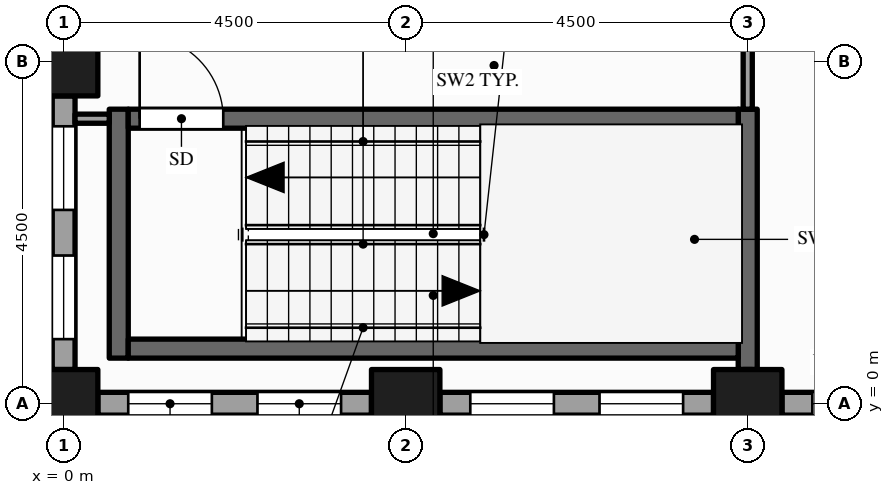
"""IFC4 building model, lengths in metres.
Left out: names, types, materials, properties, quantities, classifications, styles, units other than length and angle.
Written with IfcOpenShell. Run it as: python <this file> out.ifc"""

import sys

from ifc_helpers import new_model, si_unit, direction, frame, frame_2d, origin, origin_2d, place, context, subcontext, project, spatial, rectangle, hollow_rectangle, extrude, element, fill, save


model = new_model("IFC4")
c1 = context("Model", 3, precision=1e-05, world=origin(), true_north=direction((0.0, 1.0)))
c2 = subcontext(c1, "Body", "Model", "MODEL_VIEW")
j1 = project(units=[si_unit("LENGTHUNIT", "METRE"), si_unit("PLANEANGLEUNIT", "RADIAN")], contexts=[c1])
p1 = place(None, origin())
s1 = spatial("IfcSite", under=j1, at=p1, CompositionType="ELEMENT")
p2 = place(p1, origin())
s2 = spatial("IfcBuilding", under=s1, at=p2, CompositionType="ELEMENT")
p3 = place(p2, frame((0.0, 0.0, 155.0)))
s3 = spatial("IfcBuildingStorey", under=s2, at=p3, CompositionType="ELEMENT", Elevation=155.0)
for number, where, z_axis, x_axis in (
    (1, (0.0, 0.0, -0.15), (0.0, 0.0, 1.0), (1.0, 0.0, 0.0)),
    (2, (0.0, 4.5, -0.15), (0.0, 0.0, 1.0), (1.0, 0.0, 0.0)),
    (3, (4.5, 0.0, -0.15), (0.0, 0.0, 1.0), (1.0, 0.0, 0.0)),
    (4, (9.0, 0.0, -0.15), (0.0, 0.0, 1.0), (1.0, 0.0, 0.0)),
):
    element("IfcColumn", number, at=place(p3, frame(where, z_axis=z_axis, x_axis=x_axis)), inside=s3, PredefinedType="COLUMN", context=c2, shape_type="SweptSolid", body=[
        extrude(hollow_rectangle(XDim=0.9, YDim=0.9, WallThickness=0.045, at=origin_2d()), origin(), (0.0, 0.0, 1.0), 4.0),
    ])
p4 = place(p3, frame((0.45, 0.0, 0.0), z_axis=(0.0, 0.0, 1.0), x_axis=(1.0, 0.0, 0.0)))
e5 = element("IfcWall", 5, at=p4, inside=s3, PredefinedType="STANDARD", context=c2, shape_type="SweptSolid", body=[
    extrude(rectangle(XDim=3.6, YDim=0.3, at=frame_2d((1.8, 0.0))), origin(), (0.0, 0.0, 1.0), 3.149),
])
p5 = place(p4, frame((0.4, 0.0, 0.9)))
e6 = element("IfcOpeningElement", 6, at=p5, cuts=e5, PredefinedType="OPENING", context=c2, shape_type="SweptSolid", body=[
    extrude(rectangle(XDim=1.1, YDim=2.0, at=frame_2d((0.55, 1.0))), frame((0.0, 0.16, 0.0), z_axis=(0.0, -1.0, 0.0), x_axis=(1.0, 0.0, 0.0)), (0.0, 0.0, 1.0), 0.32),
])
p6 = place(p4, frame((2.1, 0.0, 0.9)))
e7 = element("IfcOpeningElement", 7, at=p6, cuts=e5, PredefinedType="OPENING", context=c2, shape_type="SweptSolid", body=[
    extrude(rectangle(XDim=1.1, YDim=2.0, at=frame_2d((0.55, 1.0))), frame((0.0, 0.16, 0.0), z_axis=(0.0, -1.0, 0.0), x_axis=(1.0, 0.0, 0.0)), (0.0, 0.0, 1.0), 0.32),
])
p7 = place(p3, frame((4.95, 0.0, 0.0), z_axis=(0.0, 0.0, 1.0), x_axis=(1.0, 0.0, 0.0)))
e8 = element("IfcWall", 8, at=p7, inside=s3, PredefinedType="STANDARD", context=c2, shape_type="SweptSolid", body=[
    extrude(rectangle(XDim=3.6, YDim=0.3, at=frame_2d((1.8, 0.0))), origin(), (0.0, 0.0, 1.0), 3.149),
])
p8 = place(p7, frame((0.4, 0.0, 0.9)))
e9 = element("IfcOpeningElement", 9, at=p8, cuts=e8, PredefinedType="OPENING", context=c2, shape_type="SweptSolid", body=[
    extrude(rectangle(XDim=1.1, YDim=2.0, at=frame_2d((0.55, 1.0))), frame((0.0, 0.16, 0.0), z_axis=(0.0, -1.0, 0.0), x_axis=(1.0, 0.0, 0.0)), (0.0, 0.0, 1.0), 0.32),
])
p9 = place(p7, frame((2.1, 0.0, 0.9)))
e10 = element("IfcOpeningElement", 10, at=p9, cuts=e8, PredefinedType="OPENING", context=c2, shape_type="SweptSolid", body=[
    extrude(rectangle(XDim=1.1, YDim=2.0, at=frame_2d((0.55, 1.0))), frame((0.0, 0.16, 0.0), z_axis=(0.0, -1.0, 0.0), x_axis=(1.0, 0.0, 0.0)), (0.0, 0.0, 1.0), 0.32),
])
p10 = place(p3, frame((9.45, 0.0, 0.0), z_axis=(0.0, 0.0, 1.0), x_axis=(1.0, 0.0, 0.0)))
e11 = element("IfcWall", 11, at=p10, inside=s3, PredefinedType="STANDARD", context=c2, shape_type="SweptSolid", body=[
    extrude(rectangle(XDim=3.6, YDim=0.3, at=frame_2d((1.8, 0.0))), origin(), (0.0, 0.0, 1.0), 2.87),
])
p11 = place(p10, frame((0.4, 0.0, 0.9)))
e12 = element("IfcOpeningElement", 12, at=p11, cuts=e11, PredefinedType="OPENING", context=c2, shape_type="SweptSolid", body=[
    extrude(rectangle(XDim=1.1, YDim=1.75, at=frame_2d((0.55, 0.875))), frame((0.0, 0.16, 0.0), z_axis=(0.0, -1.0, 0.0), x_axis=(1.0, 0.0, 0.0)), (0.0, 0.0, 1.0), 0.32),
])
p12 = place(p10, frame((2.1, 0.0, 0.9)))
e13 = element("IfcOpeningElement", 13, at=p12, cuts=e11, PredefinedType="OPENING", context=c2, shape_type="SweptSolid", body=[
    extrude(rectangle(XDim=1.1, YDim=1.75, at=frame_2d((0.55, 0.875))), frame((0.0, 0.16, 0.0), z_axis=(0.0, -1.0, 0.0), x_axis=(1.0, 0.0, 0.0)), (0.0, 0.0, 1.0), 0.32),
])
p13 = place(p3, frame((0.0, 4.05, 0.0), z_axis=(0.0, 0.0, 1.0), x_axis=(0.0, -1.0, 0.0)))
e14 = element("IfcWall", 14, at=p13, inside=s3, PredefinedType="STANDARD", context=c2, shape_type="SweptSolid", body=[
    extrude(rectangle(XDim=3.6, YDim=0.3, at=frame_2d((1.8, 0.0))), origin(), (0.0, 0.0, 1.0), 3.149),
])
p14 = place(p13, frame((0.4, 0.0, 0.9)))
e15 = element("IfcOpeningElement", 15, at=p14, cuts=e14, PredefinedType="OPENING", context=c2, shape_type="SweptSolid", body=[
    extrude(rectangle(XDim=1.1, YDim=2.0, at=frame_2d((0.55, 1.0))), frame((0.0, 0.16, 0.0), z_axis=(0.0, -1.0, 0.0), x_axis=(1.0, 0.0, 0.0)), (0.0, 0.0, 1.0), 0.32),
])
p15 = place(p13, frame((2.1, 0.0, 0.9)))
e16 = element("IfcOpeningElement", 16, at=p15, cuts=e14, PredefinedType="OPENING", context=c2, shape_type="SweptSolid", body=[
    extrude(rectangle(XDim=1.1, YDim=2.0, at=frame_2d((0.55, 1.0))), frame((0.0, 0.16, 0.0), z_axis=(0.0, -1.0, 0.0), x_axis=(1.0, 0.0, 0.0)), (0.0, 0.0, 1.0), 0.32),
])
p16 = place(p3, frame((0.725, 0.6, 0.0), z_axis=(0.0, 0.0, 1.0), x_axis=(0.0, 1.0, 0.0)))
e17 = element("IfcWall", 17, at=p16, inside=s3, PredefinedType="SHEAR", context=c2, shape_type="SweptSolid", body=[
    extrude(rectangle(XDim=3.275, YDim=0.25, at=frame_2d((1.637, 0.0))), origin(), (0.0, 0.0, 1.0), 3.85),
])
p17 = place(p3, frame((9.0, 0.15, 0.0), z_axis=(0.0, 0.0, 1.0), x_axis=(0.0, 1.0, 0.0)))
e18 = element("IfcWall", 18, at=p17, inside=s3, PredefinedType="PARTITIONING", context=c2, shape_type="SweptSolid", body=[
    extrude(rectangle(XDim=0.3, YDim=0.12, at=frame_2d((0.15, 0.0))), origin(), (0.0, 0.0, 1.0), 3.85),
])
p18 = place(p3, frame((9.0, 0.45, 0.0), z_axis=(0.0, 0.0, 1.0), x_axis=(0.0, 1.0, 0.0)))
e19 = element("IfcWall", 19, at=p18, inside=s3, PredefinedType="SHEAR", context=c2, shape_type="SweptSolid", body=[
    extrude(rectangle(XDim=3.425, YDim=0.25, at=frame_2d((1.712, 0.0))), origin(), (0.0, 0.0, 1.0), 3.85),
])
p19 = place(p3, frame((9.0, 3.875, 0.0), z_axis=(0.0, 0.0, 1.0), x_axis=(0.0, 1.0, 0.0)))
e20 = element("IfcWall", 20, at=p19, inside=s3, PredefinedType="PARTITIONING", context=c2, shape_type="SweptSolid", body=[
    extrude(rectangle(XDim=7.675, YDim=0.12, at=frame_2d((3.837, 0.0))), origin(), (0.0, 0.0, 1.0), 2.87),
])
p20 = place(p3, frame((0.85, 0.725, 0.0), z_axis=(0.0, 0.0, 1.0), x_axis=(1.0, 0.0, 0.0)))
e21 = element("IfcWall", 21, at=p20, inside=s3, PredefinedType="SHEAR", context=c2, shape_type="SweptSolid", body=[
    extrude(rectangle(XDim=8.025, YDim=0.25, at=frame_2d((4.012, 0.0))), origin(), (0.0, 0.0, 1.0), 3.85),
])
p21 = place(p3, frame((0.15, 3.75, 0.0), z_axis=(0.0, 0.0, 1.0), x_axis=(1.0, 0.0, 0.0)))
e22 = element("IfcWall", 22, at=p21, inside=s3, PredefinedType="PARTITIONING", context=c2, shape_type="SweptSolid", body=[
    extrude(rectangle(XDim=0.45, YDim=0.12, at=frame_2d((0.225, 0.0))), origin(), (0.0, 0.0, 1.0), 3.85),
])
p22 = place(p3, frame((0.85, 3.75, 0.0), z_axis=(0.0, 0.0, 1.0), x_axis=(1.0, 0.0, 0.0)))
e23 = element("IfcWall", 23, at=p22, inside=s3, PredefinedType="SHEAR", context=c2, shape_type="SweptSolid", body=[
    extrude(rectangle(XDim=8.025, YDim=0.25, at=frame_2d((4.012, 0.0))), origin(), (0.0, 0.0, 1.0), 3.85),
])
p23 = place(p22, frame((0.15, 0.0, 0.0)))
e24 = element("IfcOpeningElement", 24, at=p23, cuts=e23, PredefinedType="OPENING", context=c2, shape_type="SweptSolid", body=[
    extrude(rectangle(XDim=1.1, YDim=2.1, at=frame_2d((0.55, 1.05))), frame((0.0, 0.135, 0.0), z_axis=(0.0, -1.0, 0.0), x_axis=(1.0, 0.0, 0.0)), (0.0, 0.0, 1.0), 0.27),
])
p24 = place(p5, origin())
e25 = element("IfcWindow", 25, at=p24, inside=s3, PartitioningType="SINGLE_PANEL", PredefinedType="WINDOW", context=c2, shape_type="SweptSolid", body=[
    extrude(rectangle(XDim=1.1, YDim=2.0, at=frame_2d((0.55, 1.0))), frame((0.0, 0.03, 0.0), z_axis=(0.0, -1.0, 0.0), x_axis=(1.0, 0.0, 0.0)), (0.0, 0.0, 1.0), 0.06),
])
fill(e6, e25)
p25 = place(p6, origin())
e26 = element("IfcWindow", 26, at=p25, inside=s3, PartitioningType="SINGLE_PANEL", PredefinedType="WINDOW", context=c2, shape_type="SweptSolid", body=[
    extrude(rectangle(XDim=1.1, YDim=2.0, at=frame_2d((0.55, 1.0))), frame((0.0, 0.03, 0.0), z_axis=(0.0, -1.0, 0.0), x_axis=(1.0, 0.0, 0.0)), (0.0, 0.0, 1.0), 0.06),
])
fill(e7, e26)
p26 = place(p8, origin())
e27 = element("IfcWindow", 27, at=p26, inside=s3, PartitioningType="SINGLE_PANEL", PredefinedType="WINDOW", context=c2, shape_type="SweptSolid", body=[
    extrude(rectangle(XDim=1.1, YDim=2.0, at=frame_2d((0.55, 1.0))), frame((0.0, 0.03, 0.0), z_axis=(0.0, -1.0, 0.0), x_axis=(1.0, 0.0, 0.0)), (0.0, 0.0, 1.0), 0.06),
])
fill(e9, e27)
p27 = place(p9, origin())
e28 = element("IfcWindow", 28, at=p27, inside=s3, PartitioningType="SINGLE_PANEL", PredefinedType="WINDOW", context=c2, shape_type="SweptSolid", body=[
    extrude(rectangle(XDim=1.1, YDim=2.0, at=frame_2d((0.55, 1.0))), frame((0.0, 0.03, 0.0), z_axis=(0.0, -1.0, 0.0), x_axis=(1.0, 0.0, 0.0)), (0.0, 0.0, 1.0), 0.06),
])
fill(e10, e28)
p28 = place(p11, origin())
e29 = element("IfcWindow", 29, at=p28, inside=s3, PartitioningType="SINGLE_PANEL", PredefinedType="WINDOW", context=c2, shape_type="SweptSolid", body=[
    extrude(rectangle(XDim=1.1, YDim=1.75, at=frame_2d((0.55, 0.875))), frame((0.0, 0.03, 0.0), z_axis=(0.0, -1.0, 0.0), x_axis=(1.0, 0.0, 0.0)), (0.0, 0.0, 1.0), 0.06),
])
fill(e12, e29)
p29 = place(p14, origin())
e30 = element("IfcWindow", 30, at=p29, inside=s3, PartitioningType="SINGLE_PANEL", PredefinedType="WINDOW", context=c2, shape_type="SweptSolid", body=[
    extrude(rectangle(XDim=1.1, YDim=2.0, at=frame_2d((0.55, 1.0))), frame((0.0, 0.03, 0.0), z_axis=(0.0, -1.0, 0.0), x_axis=(1.0, 0.0, 0.0)), (0.0, 0.0, 1.0), 0.06),
])
fill(e15, e30)
p30 = place(p15, origin())
e31 = element("IfcWindow", 31, at=p30, inside=s3, PartitioningType="SINGLE_PANEL", PredefinedType="WINDOW", context=c2, shape_type="SweptSolid", body=[
    extrude(rectangle(XDim=1.1, YDim=2.0, at=frame_2d((0.55, 1.0))), frame((0.0, 0.03, 0.0), z_axis=(0.0, -1.0, 0.0), x_axis=(1.0, 0.0, 0.0)), (0.0, 0.0, 1.0), 0.06),
])
fill(e16, e31)
p31 = place(p23, origin())
e32 = element("IfcDoor", 32, at=p31, inside=s3, OperationType="SINGLE_SWING_LEFT", PredefinedType="DOOR", context=c2, shape_type="SweptSolid", body=[
    extrude(rectangle(XDim=1.1, YDim=2.1, at=frame_2d((0.55, 1.05))), frame((0.0, 0.025, 0.0), z_axis=(0.0, -1.0, 0.0), x_axis=(1.0, 0.0, 0.0)), (0.0, 0.0, 1.0), 0.05),
])
fill(e24, e32)
save(model, sys.argv[1])
